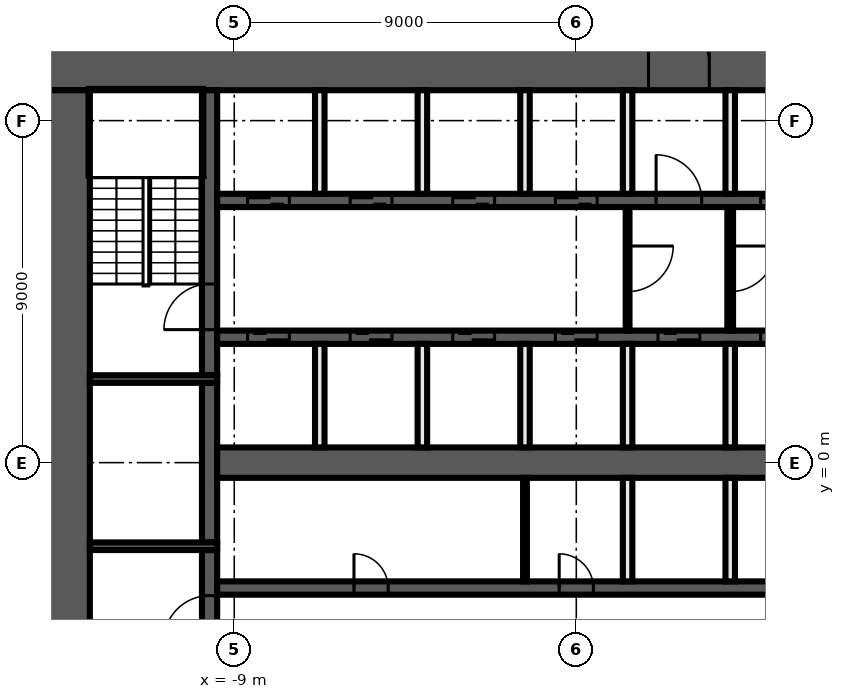
"""IFC4 building model, lengths in metres.
Left out: names, types, materials, properties, quantities, classifications, styles, units other than length and angle.
Written with IfcOpenShell. Run it as: python <this file> out.ifc"""

import sys

from ifc_helpers import new_model, si_unit, direction, frame, frame_2d, origin, place, context, subcontext, project, spatial, rectangle, extrude, element, fill, save


model = new_model("IFC4")
c1 = context("Model", 3, precision=1e-05, world=origin(), true_north=direction((0.0, 1.0)))
c2 = subcontext(c1, "Body", "Model", "MODEL_VIEW")
j1 = project(units=[si_unit("LENGTHUNIT", "METRE"), si_unit("PLANEANGLEUNIT", "RADIAN")], contexts=[c1])
p1 = place(None, origin())
s1 = spatial("IfcSite", under=j1, at=p1, CompositionType="ELEMENT")
p2 = place(p1, origin())
s2 = spatial("IfcBuilding", under=s1, at=p2, CompositionType="ELEMENT")
p3 = place(p2, frame((0.0, 0.0, 81.0)))
s3 = spatial("IfcBuildingStorey", under=s2, at=p3, CompositionType="ELEMENT", Elevation=81.0)
p4 = place(p3, frame((-14.0, 10.4, 0.0), z_axis=(0.0, 0.0, 1.0), x_axis=(1.0, 0.0, 0.0)))
e1 = element("IfcWall", 1, at=p4, inside=s3, PredefinedType="SHEAR", context=c2, shape_type="SweptSolid", body=[
    extrude(rectangle(XDim=28.0, YDim=1.2, at=frame_2d((14.0, 0.0))), origin(), (0.0, 0.0, 1.0), 3.3),
])
p5 = place(p4, frame((15.9, 0.0, 0.0)))
e2 = element("IfcOpeningElement", 2, at=p5, cuts=e1, PredefinedType="OPENING", context=c2, shape_type="SweptSolid", body=[
    extrude(rectangle(XDim=1.6, YDim=2.1, at=frame_2d((0.8, 1.05))), frame((0.0, 0.61, 0.0), z_axis=(0.0, -1.0, 0.0), x_axis=(1.0, 0.0, 0.0)), (0.0, 0.0, 1.0), 1.22),
])
p6 = place(p3, frame((-13.4, -9.8, 0.0), z_axis=(0.0, 0.0, 1.0), x_axis=(0.0, 1.0, 0.0)))
e3 = element("IfcWall", 3, at=p6, inside=s3, PredefinedType="SHEAR", context=c2, shape_type="SweptSolid", body=[
    extrude(rectangle(XDim=19.6, YDim=1.2, at=frame_2d((9.8, 0.0))), origin(), (0.0, 0.0, 1.0), 3.3),
])
p7 = place(p3, frame((-9.65, -9.8, 0.0), z_axis=(0.0, 0.0, 1.0), x_axis=(0.0, 1.0, 0.0)))
e4 = element("IfcWall", 4, at=p7, inside=s3, PredefinedType="SHEAR", context=c2, shape_type="SweptSolid", body=[
    extrude(rectangle(XDim=7.5, YDim=0.4, at=frame_2d((3.75, 0.0))), origin(), (0.0, 0.0, 1.0), 3.3),
])
p8 = place(p7, frame((5.1, 0.0, 0.0)))
e5 = element("IfcOpeningElement", 5, at=p8, cuts=e4, PredefinedType="OPENING", context=c2, shape_type="SweptSolid", body=[
    extrude(rectangle(XDim=1.2, YDim=2.1, at=frame_2d((0.6, 1.05))), frame((0.0, 0.21, 0.0), z_axis=(0.0, -1.0, 0.0), x_axis=(1.0, 0.0, 0.0)), (0.0, 0.0, 1.0), 0.42),
])
p9 = place(p3, frame((-9.65, -2.1, 0.0), z_axis=(0.0, 0.0, 1.0), x_axis=(0.0, 1.0, 0.0)))
e6 = element("IfcWall", 6, at=p9, inside=s3, PredefinedType="SHEAR", context=c2, shape_type="SweptSolid", body=[
    extrude(rectangle(XDim=4.2, YDim=0.4, at=frame_2d((2.1, 0.0))), origin(), (0.0, 0.0, 1.0), 3.3),
])
p10 = place(p3, frame((-9.65, 2.3, 0.0), z_axis=(0.0, 0.0, 1.0), x_axis=(0.0, 1.0, 0.0)))
e7 = element("IfcWall", 7, at=p10, inside=s3, PredefinedType="SHEAR", context=c2, shape_type="SweptSolid", body=[
    extrude(rectangle(XDim=7.5, YDim=0.4, at=frame_2d((3.75, 0.0))), origin(), (0.0, 0.0, 1.0), 3.3),
])
p11 = place(p10, frame((1.2, 0.0, 0.0)))
e8 = element("IfcOpeningElement", 8, at=p11, cuts=e7, PredefinedType="OPENING", context=c2, shape_type="SweptSolid", body=[
    extrude(rectangle(XDim=1.2, YDim=2.1, at=frame_2d((0.6, 1.05))), frame((0.0, 0.21, 0.0), z_axis=(0.0, -1.0, 0.0), x_axis=(1.0, 0.0, 0.0)), (0.0, 0.0, 1.0), 0.42),
])
for number, where, z_axis, x_axis in (
    (9, (-9.45, 2.2, 0.0), (0.0, 0.0, 1.0), (-1.0, 0.0, 0.0)),
    (10, (-9.45, -2.2, 0.0), (0.0, 0.0, 1.0), (-1.0, 0.0, 0.0)),
):
    element("IfcWall", number, at=place(p3, frame(where, z_axis=z_axis, x_axis=x_axis)), inside=s3, PredefinedType="SHEAR", context=c2, shape_type="SweptSolid", body=[
        extrude(rectangle(XDim=3.35, YDim=0.2, at=frame_2d((1.675, 0.0))), origin(), (0.0, 0.0, 1.0), 3.3),
    ])
p12 = place(p3, frame((-9.45, 6.9, 0.0), z_axis=(0.0, 0.0, 1.0), x_axis=(1.0, 0.0, 0.0)))
e11 = element("IfcWall", 11, at=p12, inside=s3, PredefinedType="SHEAR", context=c2, shape_type="SweptSolid", body=[
    extrude(rectangle(XDim=18.9, YDim=0.35, at=frame_2d((9.45, 0.0))), origin(), (0.0, 0.0, 1.0), 3.3),
])
p13 = place(p12, frame((0.8, 0.0, 0.0)))
e12 = element("IfcOpeningElement", 12, at=p13, cuts=e11, PredefinedType="OPENING", context=c2, shape_type="SweptSolid", body=[
    extrude(rectangle(XDim=1.1, YDim=2.1, at=frame_2d((0.55, 1.05))), frame((0.0, 0.185, 0.0), z_axis=(0.0, -1.0, 0.0), x_axis=(1.0, 0.0, 0.0)), (0.0, 0.0, 1.0), 0.37),
])
p14 = place(p12, frame((3.5, 0.0, 0.0)))
e13 = element("IfcOpeningElement", 13, at=p14, cuts=e11, PredefinedType="OPENING", context=c2, shape_type="SweptSolid", body=[
    extrude(rectangle(XDim=1.1, YDim=2.1, at=frame_2d((0.55, 1.05))), frame((0.0, 0.185, 0.0), z_axis=(0.0, -1.0, 0.0), x_axis=(1.0, 0.0, 0.0)), (0.0, 0.0, 1.0), 0.37),
])
p15 = place(p12, frame((6.2, 0.0, 0.0)))
e14 = element("IfcOpeningElement", 14, at=p15, cuts=e11, PredefinedType="OPENING", context=c2, shape_type="SweptSolid", body=[
    extrude(rectangle(XDim=1.1, YDim=2.1, at=frame_2d((0.55, 1.05))), frame((0.0, 0.185, 0.0), z_axis=(0.0, -1.0, 0.0), x_axis=(1.0, 0.0, 0.0)), (0.0, 0.0, 1.0), 0.37),
])
p16 = place(p12, frame((8.9, 0.0, 0.0)))
e15 = element("IfcOpeningElement", 15, at=p16, cuts=e11, PredefinedType="OPENING", context=c2, shape_type="SweptSolid", body=[
    extrude(rectangle(XDim=1.1, YDim=2.1, at=frame_2d((0.55, 1.05))), frame((0.0, 0.185, 0.0), z_axis=(0.0, -1.0, 0.0), x_axis=(1.0, 0.0, 0.0)), (0.0, 0.0, 1.0), 0.37),
])
p17 = place(p12, frame((11.55, 0.0, 0.0)))
e16 = element("IfcOpeningElement", 16, at=p17, cuts=e11, PredefinedType="OPENING", context=c2, shape_type="SweptSolid", body=[
    extrude(rectangle(XDim=1.2, YDim=2.1, at=frame_2d((0.6, 1.05))), frame((0.0, 0.185, 0.0), z_axis=(0.0, -1.0, 0.0), x_axis=(1.0, 0.0, 0.0)), (0.0, 0.0, 1.0), 0.37),
])
p18 = place(p12, frame((14.3, 0.0, 0.0)))
e17 = element("IfcOpeningElement", 17, at=p18, cuts=e11, PredefinedType="OPENING", context=c2, shape_type="SweptSolid", body=[
    extrude(rectangle(XDim=1.1, YDim=2.1, at=frame_2d((0.55, 1.05))), frame((0.0, 0.185, 0.0), z_axis=(0.0, -1.0, 0.0), x_axis=(1.0, 0.0, 0.0)), (0.0, 0.0, 1.0), 0.37),
])
p19 = place(p12, frame((17.0, 0.0, 0.0)))
e18 = element("IfcOpeningElement", 18, at=p19, cuts=e11, PredefinedType="OPENING", context=c2, shape_type="SweptSolid", body=[
    extrude(rectangle(XDim=1.1, YDim=2.1, at=frame_2d((0.55, 1.05))), frame((0.0, 0.185, 0.0), z_axis=(0.0, -1.0, 0.0), x_axis=(1.0, 0.0, 0.0)), (0.0, 0.0, 1.0), 0.37),
])
p20 = place(p3, frame((9.45, 3.3, 0.0), z_axis=(0.0, 0.0, 1.0), x_axis=(-1.0, 0.0, 0.0)))
e19 = element("IfcWall", 19, at=p20, inside=s3, PredefinedType="SHEAR", context=c2, shape_type="SweptSolid", body=[
    extrude(rectangle(XDim=18.9, YDim=0.35, at=frame_2d((9.45, 0.0))), origin(), (0.0, 0.0, 1.0), 3.3),
])
p21 = place(p20, frame((17.0, 0.0, 0.0)))
e20 = element("IfcOpeningElement", 20, at=p21, cuts=e19, PredefinedType="OPENING", context=c2, shape_type="SweptSolid", body=[
    extrude(rectangle(XDim=1.1, YDim=2.1, at=frame_2d((0.55, 1.05))), frame((0.0, 0.185, 0.0), z_axis=(0.0, -1.0, 0.0), x_axis=(1.0, 0.0, 0.0)), (0.0, 0.0, 1.0), 0.37),
])
p22 = place(p20, frame((14.3, 0.0, 0.0)))
e21 = element("IfcOpeningElement", 21, at=p22, cuts=e19, PredefinedType="OPENING", context=c2, shape_type="SweptSolid", body=[
    extrude(rectangle(XDim=1.1, YDim=2.1, at=frame_2d((0.55, 1.05))), frame((0.0, 0.185, 0.0), z_axis=(0.0, -1.0, 0.0), x_axis=(1.0, 0.0, 0.0)), (0.0, 0.0, 1.0), 0.37),
])
p23 = place(p20, frame((11.6, 0.0, 0.0)))
e22 = element("IfcOpeningElement", 22, at=p23, cuts=e19, PredefinedType="OPENING", context=c2, shape_type="SweptSolid", body=[
    extrude(rectangle(XDim=1.1, YDim=2.1, at=frame_2d((0.55, 1.05))), frame((0.0, 0.185, 0.0), z_axis=(0.0, -1.0, 0.0), x_axis=(1.0, 0.0, 0.0)), (0.0, 0.0, 1.0), 0.37),
])
p24 = place(p20, frame((8.9, 0.0, 0.0)))
e23 = element("IfcOpeningElement", 23, at=p24, cuts=e19, PredefinedType="OPENING", context=c2, shape_type="SweptSolid", body=[
    extrude(rectangle(XDim=1.1, YDim=2.1, at=frame_2d((0.55, 1.05))), frame((0.0, 0.185, 0.0), z_axis=(0.0, -1.0, 0.0), x_axis=(1.0, 0.0, 0.0)), (0.0, 0.0, 1.0), 0.37),
])
p25 = place(p20, frame((6.2, 0.0, 0.0)))
e24 = element("IfcOpeningElement", 24, at=p25, cuts=e19, PredefinedType="OPENING", context=c2, shape_type="SweptSolid", body=[
    extrude(rectangle(XDim=1.1, YDim=2.1, at=frame_2d((0.55, 1.05))), frame((0.0, 0.185, 0.0), z_axis=(0.0, -1.0, 0.0), x_axis=(1.0, 0.0, 0.0)), (0.0, 0.0, 1.0), 0.37),
])
p26 = place(p20, frame((3.5, 0.0, 0.0)))
e25 = element("IfcOpeningElement", 25, at=p26, cuts=e19, PredefinedType="OPENING", context=c2, shape_type="SweptSolid", body=[
    extrude(rectangle(XDim=1.1, YDim=2.1, at=frame_2d((0.55, 1.05))), frame((0.0, 0.185, 0.0), z_axis=(0.0, -1.0, 0.0), x_axis=(1.0, 0.0, 0.0)), (0.0, 0.0, 1.0), 0.37),
])
p27 = place(p20, frame((0.9, 0.0, 0.0)))
e26 = element("IfcOpeningElement", 26, at=p27, cuts=e19, PredefinedType="OPENING", context=c2, shape_type="SweptSolid", body=[
    extrude(rectangle(XDim=0.9, YDim=2.1, at=frame_2d((0.45, 1.05))), frame((0.0, 0.185, 0.0), z_axis=(0.0, -1.0, 0.0), x_axis=(1.0, 0.0, 0.0)), (0.0, 0.0, 1.0), 0.37),
])
p28 = place(p3, frame((-9.45, -3.3, 0.0), z_axis=(0.0, 0.0, 1.0), x_axis=(1.0, 0.0, 0.0)))
e27 = element("IfcWall", 27, at=p28, inside=s3, PredefinedType="SHEAR", context=c2, shape_type="SweptSolid", body=[
    extrude(rectangle(XDim=18.9, YDim=0.35, at=frame_2d((9.45, 0.0))), origin(), (0.0, 0.0, 1.0), 3.3),
])
p29 = place(p28, frame((17.0, 0.0, 0.0)))
e28 = element("IfcOpeningElement", 28, at=p29, cuts=e27, PredefinedType="OPENING", context=c2, shape_type="SweptSolid", body=[
    extrude(rectangle(XDim=1.1, YDim=2.1, at=frame_2d((0.55, 1.05))), frame((0.0, 0.185, 0.0), z_axis=(0.0, -1.0, 0.0), x_axis=(1.0, 0.0, 0.0)), (0.0, 0.0, 1.0), 0.37),
])
p30 = place(p28, frame((3.6, 0.0, 0.0)))
e29 = element("IfcOpeningElement", 29, at=p30, cuts=e27, PredefinedType="OPENING", context=c2, shape_type="SweptSolid", body=[
    extrude(rectangle(XDim=0.9, YDim=2.1, at=frame_2d((0.45, 1.05))), frame((0.0, 0.185, 0.0), z_axis=(0.0, -1.0, 0.0), x_axis=(1.0, 0.0, 0.0)), (0.0, 0.0, 1.0), 0.37),
])
p31 = place(p28, frame((9.0, 0.0, 0.0)))
e30 = element("IfcOpeningElement", 30, at=p31, cuts=e27, PredefinedType="OPENING", context=c2, shape_type="SweptSolid", body=[
    extrude(rectangle(XDim=0.9, YDim=2.1, at=frame_2d((0.45, 1.05))), frame((0.0, 0.185, 0.0), z_axis=(0.0, -1.0, 0.0), x_axis=(1.0, 0.0, 0.0)), (0.0, 0.0, 1.0), 0.37),
])
p32 = place(p3, frame((-9.45, 0.0, 0.0), z_axis=(0.0, 0.0, 1.0), x_axis=(1.0, 0.0, 0.0)))
e31 = element("IfcWall", 31, at=p32, inside=s3, PredefinedType="SHEAR", context=c2, shape_type="SweptSolid", body=[
    extrude(rectangle(XDim=18.9, YDim=0.8, at=frame_2d((9.45, 0.0))), origin(), (0.0, 0.0, 1.0), 3.3),
])
p33 = place(p3, frame((4.05, 6.725, 0.0), z_axis=(0.0, 0.0, 1.0), x_axis=(0.0, -1.0, 0.0)))
e32 = element("IfcWall", 32, at=p33, inside=s3, PredefinedType="PARTITIONING", context=c2, shape_type="SweptSolid", body=[
    extrude(rectangle(XDim=3.25, YDim=0.15, at=frame_2d((1.625, 0.0))), origin(), (0.0, 0.0, 1.0), 3.3),
])
p34 = place(p33, frame((1.025, 0.0, 0.0)))
e33 = element("IfcOpeningElement", 33, at=p34, cuts=e32, PredefinedType="OPENING", context=c2, shape_type="SweptSolid", body=[
    extrude(rectangle(XDim=1.2, YDim=2.1, at=frame_2d((0.6, 1.05))), frame((0.0, 0.085, 0.0), z_axis=(0.0, -1.0, 0.0), x_axis=(1.0, 0.0, 0.0)), (0.0, 0.0, 1.0), 0.17),
])
for number, where, z_axis, x_axis in (
    (34, (4.05, -3.125, 0.0), (0.0, 0.0, 1.0), (0.0, 1.0, 0.0)),
    (35, (4.05, 0.4, 0.0), (0.0, 0.0, 1.0), (0.0, 1.0, 0.0)),
    (36, (4.05, 7.075, 0.0), (0.0, 0.0, 1.0), (0.0, 1.0, 0.0)),
):
    element("IfcWall", number, at=place(p3, frame(where, z_axis=z_axis, x_axis=x_axis)), inside=s3, PredefinedType="SOLIDWALL", context=c2, shape_type="SweptSolid", body=[
        extrude(rectangle(XDim=2.725, YDim=0.25, at=frame_2d((1.363, 0.0))), origin(), (0.0, 0.0, 1.0), 3.3),
    ])
p35 = place(p3, frame((1.35, 6.725, 0.0), z_axis=(0.0, 0.0, 1.0), x_axis=(0.0, -1.0, 0.0)))
e37 = element("IfcWall", 37, at=p35, inside=s3, PredefinedType="PARTITIONING", context=c2, shape_type="SweptSolid", body=[
    extrude(rectangle(XDim=3.25, YDim=0.1, at=frame_2d((1.625, 0.0))), origin(), (0.0, 0.0, 1.0), 3.3),
])
p36 = place(p35, frame((1.025, 0.0, 0.0)))
e38 = element("IfcOpeningElement", 38, at=p36, cuts=e37, PredefinedType="OPENING", context=c2, shape_type="SweptSolid", body=[
    extrude(rectangle(XDim=1.2, YDim=2.1, at=frame_2d((0.6, 1.05))), frame((0.0, 0.06, 0.0), z_axis=(0.0, -1.0, 0.0), x_axis=(1.0, 0.0, 0.0)), (0.0, 0.0, 1.0), 0.12),
])
for number, where, z_axis, x_axis in (
    (39, (1.35, -3.125, 0.0), (0.0, 0.0, 1.0), (0.0, 1.0, 0.0)),
    (40, (1.35, 0.4, 0.0), (0.0, 0.0, 1.0), (0.0, 1.0, 0.0)),
    (41, (1.35, 7.075, 0.0), (0.0, 0.0, 1.0), (0.0, 1.0, 0.0)),
):
    element("IfcWall", number, at=place(p3, frame(where, z_axis=z_axis, x_axis=x_axis)), inside=s3, PredefinedType="SOLIDWALL", context=c2, shape_type="SweptSolid", body=[
        extrude(rectangle(XDim=2.725, YDim=0.25, at=frame_2d((1.363, 0.0))), origin(), (0.0, 0.0, 1.0), 3.3),
    ])
p37 = place(p3, frame((-1.35, -3.125, 0.0), z_axis=(0.0, 0.0, 1.0), x_axis=(0.0, 1.0, 0.0)))
e42 = element("IfcWall", 42, at=p37, inside=s3, PredefinedType="PARTITIONING", context=c2, shape_type="SweptSolid", body=[
    extrude(rectangle(XDim=2.725, YDim=0.1, at=frame_2d((1.363, 0.0))), origin(), (0.0, 0.0, 1.0), 3.3),
])
for number, where, z_axis, x_axis in (
    (43, (-1.35, 0.4, 0.0), (0.0, 0.0, 1.0), (0.0, 1.0, 0.0)),
    (44, (-1.35, 7.075, 0.0), (0.0, 0.0, 1.0), (0.0, 1.0, 0.0)),
    (45, (-4.05, 0.4, 0.0), (0.0, 0.0, 1.0), (0.0, 1.0, 0.0)),
    (46, (-4.05, 7.075, 0.0), (0.0, 0.0, 1.0), (0.0, 1.0, 0.0)),
    (47, (-6.75, 0.4, 0.0), (0.0, 0.0, 1.0), (0.0, 1.0, 0.0)),
    (48, (-6.75, 7.075, 0.0), (0.0, 0.0, 1.0), (0.0, 1.0, 0.0)),
):
    element("IfcWall", number, at=place(p3, frame(where, z_axis=z_axis, x_axis=x_axis)), inside=s3, PredefinedType="SOLIDWALL", context=c2, shape_type="SweptSolid", body=[
        extrude(rectangle(XDim=2.725, YDim=0.25, at=frame_2d((1.363, 0.0))), origin(), (0.0, 0.0, 1.0), 3.3),
    ])
p38 = place(p13, origin())
e49 = element("IfcDoor", 49, at=p38, inside=s3, OperationType="DOUBLE_DOOR_SLIDING", PredefinedType="DOOR", context=c2, shape_type="SweptSolid", body=[
    extrude(rectangle(XDim=1.1, YDim=2.1, at=frame_2d((0.55, 1.05))), frame((0.0, 0.025, 0.0), z_axis=(0.0, -1.0, 0.0), x_axis=(1.0, 0.0, 0.0)), (0.0, 0.0, 1.0), 0.05),
])
fill(e12, e49)
p39 = place(p14, origin())
e50 = element("IfcDoor", 50, at=p39, inside=s3, OperationType="DOUBLE_DOOR_SLIDING", PredefinedType="DOOR", context=c2, shape_type="SweptSolid", body=[
    extrude(rectangle(XDim=1.1, YDim=2.1, at=frame_2d((0.55, 1.05))), frame((0.0, 0.025, 0.0), z_axis=(0.0, -1.0, 0.0), x_axis=(1.0, 0.0, 0.0)), (0.0, 0.0, 1.0), 0.05),
])
fill(e13, e50)
p40 = place(p15, origin())
e51 = element("IfcDoor", 51, at=p40, inside=s3, OperationType="DOUBLE_DOOR_SLIDING", PredefinedType="DOOR", context=c2, shape_type="SweptSolid", body=[
    extrude(rectangle(XDim=1.1, YDim=2.1, at=frame_2d((0.55, 1.05))), frame((0.0, 0.025, 0.0), z_axis=(0.0, -1.0, 0.0), x_axis=(1.0, 0.0, 0.0)), (0.0, 0.0, 1.0), 0.05),
])
fill(e14, e51)
p41 = place(p16, origin())
e52 = element("IfcDoor", 52, at=p41, inside=s3, OperationType="DOUBLE_DOOR_SLIDING", PredefinedType="DOOR", context=c2, shape_type="SweptSolid", body=[
    extrude(rectangle(XDim=1.1, YDim=2.1, at=frame_2d((0.55, 1.05))), frame((0.0, 0.025, 0.0), z_axis=(0.0, -1.0, 0.0), x_axis=(1.0, 0.0, 0.0)), (0.0, 0.0, 1.0), 0.05),
])
fill(e15, e52)
p42 = place(p5, origin())
e53 = element("IfcDoor", 53, at=p42, inside=s3, OperationType="DOUBLE_DOOR_SINGLE_SWING", PredefinedType="DOOR", context=c2, shape_type="SweptSolid", body=[
    extrude(rectangle(XDim=1.6, YDim=2.1, at=frame_2d((0.8, 1.05))), frame((0.0, 0.025, 0.0), z_axis=(0.0, -1.0, 0.0), x_axis=(1.0, 0.0, 0.0)), (0.0, 0.0, 1.0), 0.05),
])
fill(e2, e53)
p43 = place(p17, origin())
e54 = element("IfcDoor", 54, at=p43, inside=s3, OperationType="SINGLE_SWING_LEFT", PredefinedType="DOOR", context=c2, shape_type="SweptSolid", body=[
    extrude(rectangle(XDim=1.2, YDim=2.1, at=frame_2d((0.6, 1.05))), frame((0.0, 0.025, 0.0), z_axis=(0.0, -1.0, 0.0), x_axis=(1.0, 0.0, 0.0)), (0.0, 0.0, 1.0), 0.05),
])
fill(e16, e54)
p44 = place(p18, origin())
e55 = element("IfcDoor", 55, at=p44, inside=s3, OperationType="DOUBLE_DOOR_SLIDING", PredefinedType="DOOR", context=c2, shape_type="SweptSolid", body=[
    extrude(rectangle(XDim=1.1, YDim=2.1, at=frame_2d((0.55, 1.05))), frame((0.0, 0.025, 0.0), z_axis=(0.0, -1.0, 0.0), x_axis=(1.0, 0.0, 0.0)), (0.0, 0.0, 1.0), 0.05),
])
fill(e17, e55)
p45 = place(p21, origin())
e56 = element("IfcDoor", 56, at=p45, inside=s3, OperationType="DOUBLE_DOOR_SLIDING", PredefinedType="DOOR", context=c2, shape_type="SweptSolid", body=[
    extrude(rectangle(XDim=1.1, YDim=2.1, at=frame_2d((0.55, 1.05))), frame((0.0, 0.025, 0.0), z_axis=(0.0, -1.0, 0.0), x_axis=(1.0, 0.0, 0.0)), (0.0, 0.0, 1.0), 0.05),
])
fill(e20, e56)
p46 = place(p22, origin())
e57 = element("IfcDoor", 57, at=p46, inside=s3, OperationType="DOUBLE_DOOR_SLIDING", PredefinedType="DOOR", context=c2, shape_type="SweptSolid", body=[
    extrude(rectangle(XDim=1.1, YDim=2.1, at=frame_2d((0.55, 1.05))), frame((0.0, 0.025, 0.0), z_axis=(0.0, -1.0, 0.0), x_axis=(1.0, 0.0, 0.0)), (0.0, 0.0, 1.0), 0.05),
])
fill(e21, e57)
p47 = place(p23, origin())
e58 = element("IfcDoor", 58, at=p47, inside=s3, OperationType="DOUBLE_DOOR_SLIDING", PredefinedType="DOOR", context=c2, shape_type="SweptSolid", body=[
    extrude(rectangle(XDim=1.1, YDim=2.1, at=frame_2d((0.55, 1.05))), frame((0.0, 0.025, 0.0), z_axis=(0.0, -1.0, 0.0), x_axis=(1.0, 0.0, 0.0)), (0.0, 0.0, 1.0), 0.05),
])
fill(e22, e58)
p48 = place(p24, origin())
e59 = element("IfcDoor", 59, at=p48, inside=s3, OperationType="DOUBLE_DOOR_SLIDING", PredefinedType="DOOR", context=c2, shape_type="SweptSolid", body=[
    extrude(rectangle(XDim=1.1, YDim=2.1, at=frame_2d((0.55, 1.05))), frame((0.0, 0.025, 0.0), z_axis=(0.0, -1.0, 0.0), x_axis=(1.0, 0.0, 0.0)), (0.0, 0.0, 1.0), 0.05),
])
fill(e23, e59)
p49 = place(p25, origin())
e60 = element("IfcDoor", 60, at=p49, inside=s3, OperationType="DOUBLE_DOOR_SLIDING", PredefinedType="DOOR", context=c2, shape_type="SweptSolid", body=[
    extrude(rectangle(XDim=1.1, YDim=2.1, at=frame_2d((0.55, 1.05))), frame((0.0, 0.025, 0.0), z_axis=(0.0, -1.0, 0.0), x_axis=(1.0, 0.0, 0.0)), (0.0, 0.0, 1.0), 0.05),
])
fill(e24, e60)
p50 = place(p26, origin())
e61 = element("IfcDoor", 61, at=p50, inside=s3, OperationType="DOUBLE_DOOR_SLIDING", PredefinedType="DOOR", context=c2, shape_type="SweptSolid", body=[
    extrude(rectangle(XDim=1.1, YDim=2.1, at=frame_2d((0.55, 1.05))), frame((0.0, 0.025, 0.0), z_axis=(0.0, -1.0, 0.0), x_axis=(1.0, 0.0, 0.0)), (0.0, 0.0, 1.0), 0.05),
])
fill(e25, e61)
p51 = place(p30, origin())
e62 = element("IfcDoor", 62, at=p51, inside=s3, OperationType="SINGLE_SWING_RIGHT", PredefinedType="DOOR", context=c2, shape_type="SweptSolid", body=[
    extrude(rectangle(XDim=0.9, YDim=2.1, at=frame_2d((0.45, 1.05))), frame((0.0, 0.025, 0.0), z_axis=(0.0, -1.0, 0.0), x_axis=(1.0, 0.0, 0.0)), (0.0, 0.0, 1.0), 0.05),
])
fill(e29, e62)
p52 = place(p31, origin())
e63 = element("IfcDoor", 63, at=p52, inside=s3, OperationType="SINGLE_SWING_LEFT", PredefinedType="DOOR", context=c2, shape_type="SweptSolid", body=[
    extrude(rectangle(XDim=0.9, YDim=2.1, at=frame_2d((0.45, 1.05))), frame((0.0, 0.025, 0.0), z_axis=(0.0, -1.0, 0.0), x_axis=(1.0, 0.0, 0.0)), (0.0, 0.0, 1.0), 0.05),
])
fill(e30, e63)
p53 = place(p11, origin())
e64 = element("IfcDoor", 64, at=p53, inside=s3, OperationType="SINGLE_SWING_RIGHT", PredefinedType="DOOR", context=c2, shape_type="SweptSolid", body=[
    extrude(rectangle(XDim=1.2, YDim=2.1, at=frame_2d((0.6, 1.05))), frame((0.0, 0.025, 0.0), z_axis=(0.0, -1.0, 0.0), x_axis=(1.0, 0.0, 0.0)), (0.0, 0.0, 1.0), 0.05),
])
fill(e8, e64)
p54 = place(p8, origin())
e65 = element("IfcDoor", 65, at=p54, inside=s3, OperationType="SINGLE_SWING_LEFT", PredefinedType="DOOR", context=c2, shape_type="SweptSolid", body=[
    extrude(rectangle(XDim=1.2, YDim=2.1, at=frame_2d((0.6, 1.05))), frame((0.0, 0.025, 0.0), z_axis=(0.0, -1.0, 0.0), x_axis=(1.0, 0.0, 0.0)), (0.0, 0.0, 1.0), 0.05),
])
fill(e5, e65)
p55 = place(p36, origin())
e66 = element("IfcDoor", 66, at=p55, inside=s3, OperationType="SINGLE_SWING_LEFT", PredefinedType="DOOR", context=c2, shape_type="SweptSolid", body=[
    extrude(rectangle(XDim=1.2, YDim=2.1, at=frame_2d((0.6, 1.05))), frame((0.0, 0.025, 0.0), z_axis=(0.0, -1.0, 0.0), x_axis=(1.0, 0.0, 0.0)), (0.0, 0.0, 1.0), 0.05),
])
fill(e38, e66)
p56 = place(p34, origin())
e67 = element("IfcDoor", 67, at=p56, inside=s3, OperationType="SINGLE_SWING_RIGHT", PredefinedType="DOOR", context=c2, shape_type="SweptSolid", body=[
    extrude(rectangle(XDim=1.2, YDim=2.1, at=frame_2d((0.6, 1.05))), frame((0.0, 0.025, 0.0), z_axis=(0.0, -1.0, 0.0), x_axis=(1.0, 0.0, 0.0)), (0.0, 0.0, 1.0), 0.05),
])
fill(e33, e67)
save(model, sys.argv[1])
